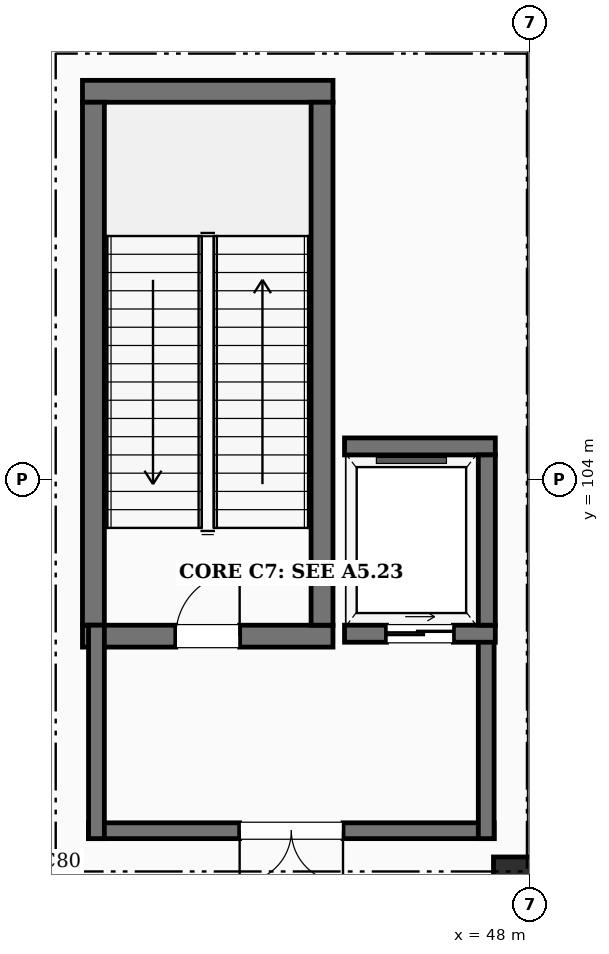
"""IFC4 building model, lengths in metres.
Left out: names, types, materials, properties, quantities, classifications, styles, units other than length and angle.
Written with IfcOpenShell. Run it as: python <this file> out.ifc"""

import sys

from ifc_helpers import new_model, si_unit, direction, frame, frame_2d, origin, origin_2d, place, context, subcontext, project, spatial, rectangle, extrude, element, fill, save


model = new_model("IFC4")
c1 = context("Model", 3, precision=1e-05, world=origin(), true_north=direction((0.0, 1.0)))
c2 = subcontext(c1, "Body", "Model", "MODEL_VIEW")
j1 = project(units=[si_unit("LENGTHUNIT", "METRE"), si_unit("PLANEANGLEUNIT", "RADIAN")], contexts=[c1])
p1 = place(None, origin())
s1 = spatial("IfcSite", under=j1, at=p1, CompositionType="ELEMENT")
p2 = place(p1, origin())
s2 = spatial("IfcBuilding", under=s1, at=p2, CompositionType="ELEMENT")
p3 = place(p2, origin())
s3 = spatial("IfcBuildingStorey", under=s2, at=p3, CompositionType="ELEMENT", Elevation=0.0)
p4 = place(p3, frame((48.0, 97.388, 0.0), z_axis=(0.0, 0.0, 1.0), x_axis=(1.0, 0.0, 0.0)))
e1 = element("IfcColumn", 1, at=p4, inside=s3, PredefinedType="COLUMN", context=c2, shape_type="SweptSolid", body=[
    extrude(rectangle(XDim=1.2, YDim=0.8, at=origin_2d()), origin(), (0.0, 0.0, 1.0), 5.4),
])
p5 = place(p3, frame((40.64, 101.42, 0.0), z_axis=(0.0, 0.0, 1.0), x_axis=(1.0, 0.0, 0.0)))
e2 = element("IfcWall", 2, at=p5, inside=s3, PredefinedType="SHEAR", context=c2, shape_type="SweptSolid", body=[
    extrude(rectangle(XDim=4.12, YDim=0.36, at=frame_2d((2.06, 0.0))), origin(), (0.0, 0.0, 1.0), 5.4),
])
p6 = place(p5, frame((1.535, 0.0, 0.0)))
e3 = element("IfcOpeningElement", 3, at=p6, cuts=e2, PredefinedType="OPENING", context=c2, shape_type="SweptSolid", body=[
    extrude(rectangle(XDim=1.05, YDim=2.15, at=frame_2d((0.525, 1.075))), frame((0.0, 0.19, 0.0), z_axis=(0.0, -1.0, 0.0), x_axis=(1.0, 0.0, 0.0)), (0.0, 0.0, 1.0), 0.38),
])
p7 = place(p3, frame((40.64, 110.38, 0.0), z_axis=(0.0, 0.0, 1.0), x_axis=(1.0, 0.0, 0.0)))
e4 = element("IfcWall", 4, at=p7, inside=s3, PredefinedType="SHEAR", context=c2, shape_type="SweptSolid", body=[
    extrude(rectangle(XDim=4.12, YDim=0.36, at=frame_2d((2.06, 0.0))), origin(), (0.0, 0.0, 1.0), 5.4),
])
for number, where, z_axis, x_axis in (
    (5, (40.82, 101.6, 0.0), (0.0, 0.0, 1.0), (0.0, 1.0, 0.0)),
    (6, (44.58, 101.6, 0.0), (0.0, 0.0, 1.0), (0.0, 1.0, 0.0)),
):
    element("IfcWall", number, at=place(p3, frame(where, z_axis=z_axis, x_axis=x_axis)), inside=s3, PredefinedType="SHEAR", context=c2, shape_type="SweptSolid", body=[
        extrude(rectangle(XDim=8.6, YDim=0.36, at=frame_2d((4.3, 0.0))), origin(), (0.0, 0.0, 1.0), 5.4),
    ])
p8 = place(p3, frame((47.41, 98.22, 0.0), z_axis=(0.0, 0.0, 1.0), x_axis=(-1.0, 0.0, 0.0)))
e7 = element("IfcWall", 7, at=p8, inside=s3, PredefinedType="SHEAR", context=c2, shape_type="SweptSolid", body=[
    extrude(rectangle(XDim=6.67, YDim=0.26, at=frame_2d((3.335, 0.0))), origin(), (0.0, 0.0, 1.0), 5.4),
])
p9 = place(p8, frame((2.485, 0.0, 0.0)))
e8 = element("IfcOpeningElement", 8, at=p9, cuts=e7, PredefinedType="OPENING", context=c2, shape_type="SweptSolid", body=[
    extrude(rectangle(XDim=1.7, YDim=2.2, at=frame_2d((0.85, 1.1))), frame((0.0, 0.14, 0.0), z_axis=(0.0, -1.0, 0.0), x_axis=(1.0, 0.0, 0.0)), (0.0, 0.0, 1.0), 0.28),
])
for number, where, z_axis, x_axis in (
    (9, (40.87, 98.09, 0.0), (0.0, 0.0, 1.0), (0.0, 1.0, 0.0)),
    (10, (47.28, 98.09, 0.0), (0.0, 0.0, 1.0), (0.0, 1.0, 0.0)),
):
    element("IfcWall", number, at=place(p3, frame(where, z_axis=z_axis, x_axis=x_axis)), inside=s3, PredefinedType="SHEAR", context=c2, shape_type="SweptSolid", body=[
        extrude(rectangle(XDim=3.51, YDim=0.26, at=frame_2d((1.755, 0.0))), origin(), (0.0, 0.0, 1.0), 5.4),
    ])
p10 = place(p3, frame((44.95, 101.46, 0.0), z_axis=(0.0, 0.0, 1.0), x_axis=(1.0, 0.0, 0.0)))
e11 = element("IfcWall", 11, at=p10, inside=s3, PredefinedType="SHEAR", context=c2, shape_type="SweptSolid", body=[
    extrude(rectangle(XDim=2.48, YDim=0.28, at=frame_2d((1.24, 0.0))), origin(), (0.0, 0.0, 1.0), 5.4),
])
p11 = place(p10, frame((0.69, 0.0, 0.0)))
e12 = element("IfcOpeningElement", 12, at=p11, cuts=e11, PredefinedType="OPENING", context=c2, shape_type="SweptSolid", body=[
    extrude(rectangle(XDim=1.1, YDim=2.15, at=frame_2d((0.55, 1.075))), frame((0.0, 0.15, 0.0), z_axis=(0.0, -1.0, 0.0), x_axis=(1.0, 0.0, 0.0)), (0.0, 0.0, 1.0), 0.3),
])
p12 = place(p3, frame((44.95, 104.54, 0.0), z_axis=(0.0, 0.0, 1.0), x_axis=(1.0, 0.0, 0.0)))
e13 = element("IfcWall", 13, at=p12, inside=s3, PredefinedType="SHEAR", context=c2, shape_type="SweptSolid", body=[
    extrude(rectangle(XDim=2.48, YDim=0.28, at=frame_2d((1.24, 0.0))), origin(), (0.0, 0.0, 1.0), 5.4),
])
p13 = place(p3, frame((47.29, 101.6, 0.0), z_axis=(0.0, 0.0, 1.0), x_axis=(0.0, 1.0, 0.0)))
e14 = element("IfcWall", 14, at=p13, inside=s3, PredefinedType="SHEAR", context=c2, shape_type="SweptSolid", body=[
    extrude(rectangle(XDim=2.8, YDim=0.28, at=frame_2d((1.4, 0.0))), origin(), (0.0, 0.0, 1.0), 5.4),
])
p14 = place(p6, origin())
e15 = element("IfcDoor", 15, at=p14, inside=s3, OperationType="SINGLE_SWING_RIGHT", PredefinedType="DOOR", context=c2, shape_type="SweptSolid", body=[
    extrude(rectangle(XDim=1.05, YDim=2.15, at=frame_2d((0.525, 1.075))), frame((0.0, 0.025, 0.0), z_axis=(0.0, -1.0, 0.0), x_axis=(1.0, 0.0, 0.0)), (0.0, 0.0, 1.0), 0.05),
])
fill(e3, e15)
p15 = place(p9, origin())
e16 = element("IfcDoor", 16, at=p15, inside=s3, OperationType="DOUBLE_DOOR_SINGLE_SWING", PredefinedType="DOOR", context=c2, shape_type="SweptSolid", body=[
    extrude(rectangle(XDim=1.7, YDim=2.2, at=frame_2d((0.85, 1.1))), frame((0.0, 0.025, 0.0), z_axis=(0.0, -1.0, 0.0), x_axis=(1.0, 0.0, 0.0)), (0.0, 0.0, 1.0), 0.05),
])
fill(e8, e16)
p16 = place(p11, origin())
e17 = element("IfcDoor", 17, at=p16, inside=s3, OperationType="SLIDING_TO_LEFT", PredefinedType="DOOR", context=c2, shape_type="SweptSolid", body=[
    extrude(rectangle(XDim=1.1, YDim=2.15, at=frame_2d((0.55, 1.075))), frame((0.0, 0.025, 0.0), z_axis=(0.0, -1.0, 0.0), x_axis=(1.0, 0.0, 0.0)), (0.0, 0.0, 1.0), 0.05),
])
fill(e12, e17)
save(model, sys.argv[1])
